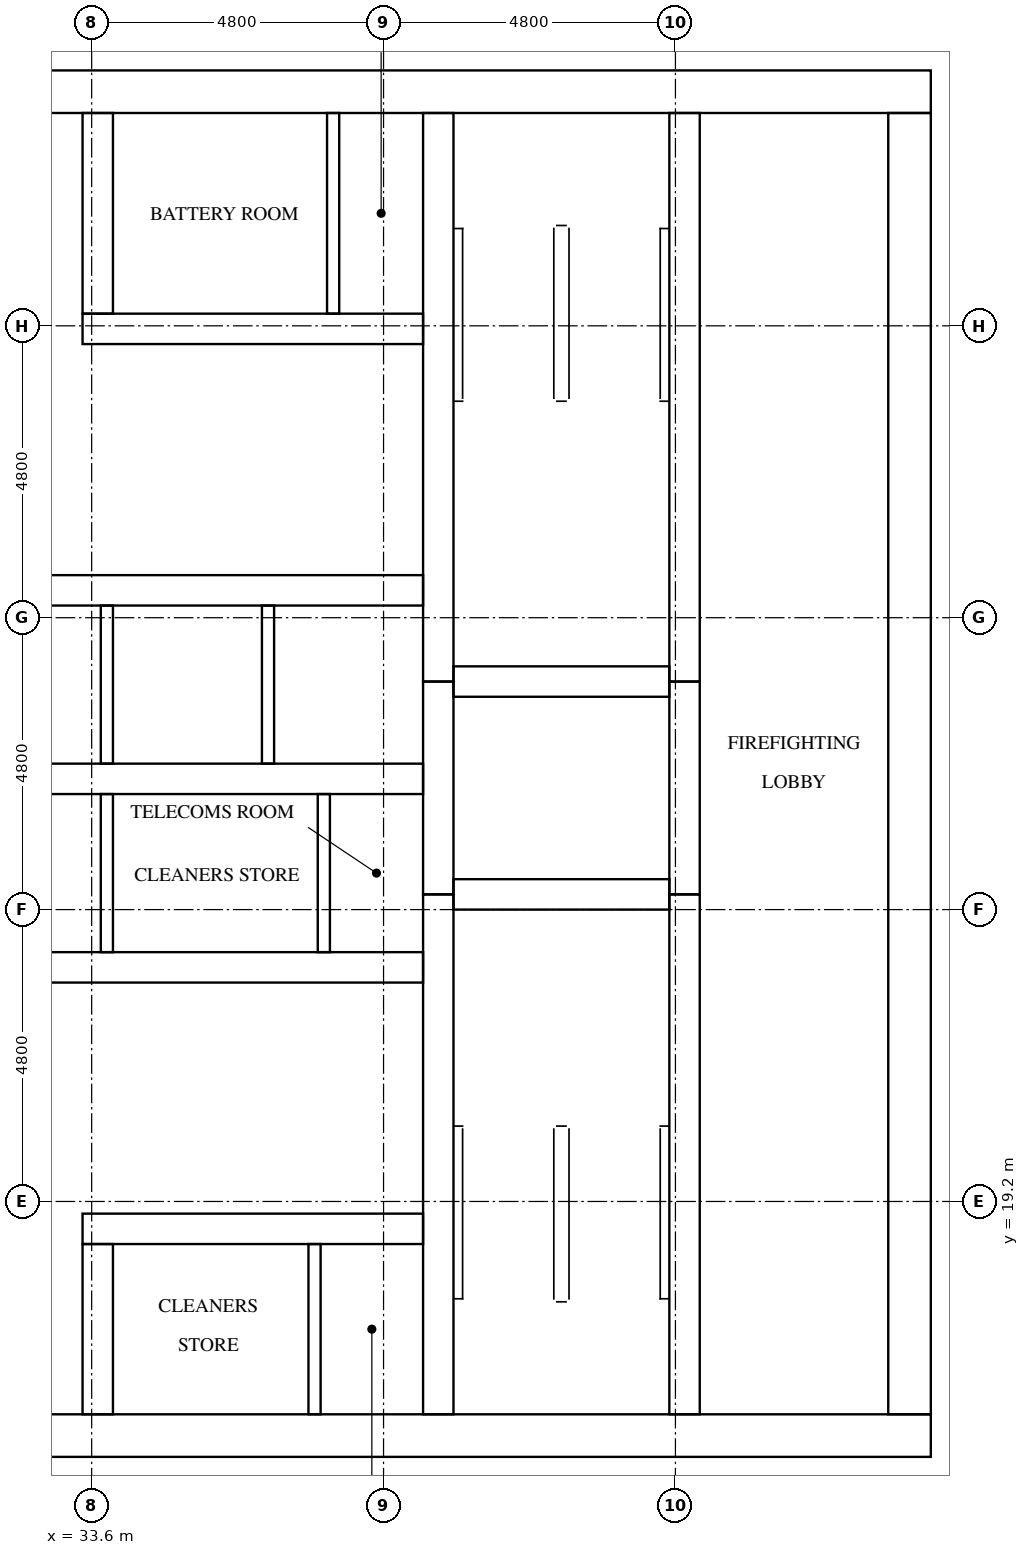
"""IFC4 building model, lengths in metres.
Left out: names, types, materials, properties, quantities, classifications, styles, units other than length and angle.
Written with IfcOpenShell. Run it as: python <this file> out.ifc"""

import sys

from ifc_helpers import new_model, si_unit, direction, frame, frame_2d, origin, place, context, subcontext, project, spatial, rectangle, extrude, element, fill, save


model = new_model("IFC4")
c1 = context("Model", 3, precision=1e-05, world=origin(), true_north=direction((0.0, 1.0)))
c2 = subcontext(c1, "Body", "Model", "MODEL_VIEW")
j1 = project(units=[si_unit("LENGTHUNIT", "METRE"), si_unit("PLANEANGLEUNIT", "RADIAN")], contexts=[c1])
p1 = place(None, origin())
s1 = spatial("IfcSite", under=j1, at=p1, CompositionType="ELEMENT")
p2 = place(p1, origin())
s2 = spatial("IfcBuilding", under=s1, at=p2, CompositionType="ELEMENT")
p3 = place(p2, frame((0.0, 0.0, 182.4)))
s3 = spatial("IfcBuildingStorey", under=s2, at=p3, CompositionType="ELEMENT", Elevation=182.4)
p4 = place(p3, frame((15.0, 15.35, 0.0), z_axis=(0.0, 0.0, 1.0), x_axis=(1.0, 0.0, 0.0)))
e1 = element("IfcWall", 1, at=p4, inside=s3, PredefinedType="SHEAR", context=c2, shape_type="SweptSolid", body=[
    extrude(rectangle(XDim=32.4, YDim=0.7, at=frame_2d((16.2, 0.0))), origin(), (0.0, 0.0, 1.0), 3.2),
])
p5 = place(p4, frame((15.3, 0.0, 0.0)))
e2 = element("IfcOpeningElement", 2, at=p5, cuts=e1, PredefinedType="OPENING", context=c2, shape_type="SweptSolid", body=[
    extrude(rectangle(XDim=1.8, YDim=2.1, at=frame_2d((0.9, 1.05))), frame((0.0, 0.36, 0.0), z_axis=(0.0, -1.0, 0.0), x_axis=(1.0, 0.0, 0.0)), (0.0, 0.0, 1.0), 0.72),
])
p6 = place(p3, frame((15.0, 37.45, 0.0), z_axis=(0.0, 0.0, 1.0), x_axis=(1.0, 0.0, 0.0)))
e3 = element("IfcWall", 3, at=p6, inside=s3, PredefinedType="SHEAR", context=c2, shape_type="SweptSolid", body=[
    extrude(rectangle(XDim=32.4, YDim=0.7, at=frame_2d((16.2, 0.0))), origin(), (0.0, 0.0, 1.0), 3.2),
])
p7 = place(p6, frame((15.3, 0.0, 0.0)))
e4 = element("IfcOpeningElement", 4, at=p7, cuts=e3, PredefinedType="OPENING", context=c2, shape_type="SweptSolid", body=[
    extrude(rectangle(XDim=1.8, YDim=2.1, at=frame_2d((0.9, 1.05))), frame((0.0, 0.36, 0.0), z_axis=(0.0, -1.0, 0.0), x_axis=(1.0, 0.0, 0.0)), (0.0, 0.0, 1.0), 0.72),
])
p8 = place(p6, frame((1.544, 0.0, 0.0)))
e5 = element("IfcOpeningElement", 5, at=p8, cuts=e3, PredefinedType="OPENING", context=c2, shape_type="SweptSolid", body=[
    extrude(rectangle(XDim=1.0, YDim=2.1, at=frame_2d((0.5, 1.05))), frame((0.0, 0.36, 0.0), z_axis=(0.0, -1.0, 0.0), x_axis=(1.0, 0.0, 0.0)), (0.0, 0.0, 1.0), 0.72),
])
p9 = place(p6, frame((5.219, 0.0, 0.0)))
e6 = element("IfcOpeningElement", 6, at=p9, cuts=e3, PredefinedType="OPENING", context=c2, shape_type="SweptSolid", body=[
    extrude(rectangle(XDim=1.0, YDim=2.1, at=frame_2d((0.5, 1.05))), frame((0.0, 0.36, 0.0), z_axis=(0.0, -1.0, 0.0), x_axis=(1.0, 0.0, 0.0)), (0.0, 0.0, 1.0), 0.72),
])
p10 = place(p3, frame((47.05, 15.7, 0.0), z_axis=(0.0, 0.0, 1.0), x_axis=(0.0, 1.0, 0.0)))
e7 = element("IfcWall", 7, at=p10, inside=s3, PredefinedType="SHEAR", context=c2, shape_type="SweptSolid", body=[
    extrude(rectangle(XDim=21.4, YDim=0.7, at=frame_2d((10.7, 0.0))), origin(), (0.0, 0.0, 1.0), 3.2),
])
p11 = place(p10, frame((10.4, 0.0, 0.0)))
e8 = element("IfcOpeningElement", 8, at=p11, cuts=e7, PredefinedType="OPENING", context=c2, shape_type="SweptSolid", body=[
    extrude(rectangle(XDim=1.2, YDim=2.1, at=frame_2d((0.6, 1.05))), frame((0.0, 0.36, 0.0), z_axis=(0.0, -1.0, 0.0), x_axis=(1.0, 0.0, 0.0)), (0.0, 0.0, 1.0), 0.72),
])
p12 = place(p3, frame((39.3, 15.7, 0.0), z_axis=(0.0, 0.0, 1.0), x_axis=(0.0, 1.0, 0.0)))
e9 = element("IfcWall", 9, at=p12, inside=s3, PredefinedType="SHEAR", context=c2, shape_type="SweptSolid", body=[
    extrude(rectangle(XDim=8.55, YDim=0.5, at=frame_2d((4.275, 0.0))), origin(), (0.0, 0.0, 1.0), 3.2),
])
p13 = place(p3, frame((39.3, 24.25, 0.0), z_axis=(0.0, 0.0, 1.0), x_axis=(0.0, 1.0, 0.0)))
e10 = element("IfcWall", 10, at=p13, inside=s3, PredefinedType="SHEAR", context=c2, shape_type="SweptSolid", body=[
    extrude(rectangle(XDim=3.5, YDim=0.5, at=frame_2d((1.75, 0.0))), origin(), (0.0, 0.0, 1.0), 3.2),
])
p14 = place(p3, frame((39.3, 27.75, 0.0), z_axis=(0.0, 0.0, 1.0), x_axis=(0.0, 1.0, 0.0)))
e11 = element("IfcWall", 11, at=p14, inside=s3, PredefinedType="SHEAR", context=c2, shape_type="SweptSolid", body=[
    extrude(rectangle(XDim=9.35, YDim=0.5, at=frame_2d((4.675, 0.0))), origin(), (0.0, 0.0, 1.0), 3.2),
])
p15 = place(p3, frame((43.35, 15.7, 0.0), z_axis=(0.0, 0.0, 1.0), x_axis=(0.0, 1.0, 0.0)))
e12 = element("IfcWall", 12, at=p15, inside=s3, PredefinedType="SHEAR", context=c2, shape_type="SweptSolid", body=[
    extrude(rectangle(XDim=8.55, YDim=0.5, at=frame_2d((4.275, 0.0))), origin(), (0.0, 0.0, 1.0), 3.2),
])
p16 = place(p15, frame((0.5, 0.0, 0.0)))
e13 = element("IfcOpeningElement", 13, at=p16, cuts=e12, PredefinedType="OPENING", context=c2, shape_type="SweptSolid", body=[
    extrude(rectangle(XDim=1.2, YDim=2.1, at=frame_2d((0.6, 1.05))), frame((0.0, 0.26, 0.0), z_axis=(0.0, -1.0, 0.0), x_axis=(1.0, 0.0, 0.0)), (0.0, 0.0, 1.0), 0.52),
])
p17 = place(p3, frame((43.35, 24.25, 0.0), z_axis=(0.0, 0.0, 1.0), x_axis=(0.0, 1.0, 0.0)))
e14 = element("IfcWall", 14, at=p17, inside=s3, PredefinedType="SHEAR", context=c2, shape_type="SweptSolid", body=[
    extrude(rectangle(XDim=3.5, YDim=0.5, at=frame_2d((1.75, 0.0))), origin(), (0.0, 0.0, 1.0), 3.2),
])
p18 = place(p17, frame((1.2, 0.0, 0.0)))
e15 = element("IfcOpeningElement", 15, at=p18, cuts=e14, PredefinedType="OPENING", context=c2, shape_type="SweptSolid", body=[
    extrude(rectangle(XDim=1.1, YDim=2.1, at=frame_2d((0.55, 1.05))), frame((0.0, 0.26, 0.0), z_axis=(0.0, -1.0, 0.0), x_axis=(1.0, 0.0, 0.0)), (0.0, 0.0, 1.0), 0.52),
])
p19 = place(p3, frame((43.35, 27.75, 0.0), z_axis=(0.0, 0.0, 1.0), x_axis=(0.0, 1.0, 0.0)))
e16 = element("IfcWall", 16, at=p19, inside=s3, PredefinedType="SHEAR", context=c2, shape_type="SweptSolid", body=[
    extrude(rectangle(XDim=9.35, YDim=0.5, at=frame_2d((4.675, 0.0))), origin(), (0.0, 0.0, 1.0), 3.2),
])
p20 = place(p19, frame((7.65, 0.0, 0.0)))
e17 = element("IfcOpeningElement", 17, at=p20, cuts=e16, PredefinedType="OPENING", context=c2, shape_type="SweptSolid", body=[
    extrude(rectangle(XDim=1.2, YDim=2.1, at=frame_2d((0.6, 1.05))), frame((0.0, 0.26, 0.0), z_axis=(0.0, -1.0, 0.0), x_axis=(1.0, 0.0, 0.0)), (0.0, 0.0, 1.0), 0.52),
])
for number, where, z_axis, x_axis in (
    (18, (39.55, 24.25, 0.0), (0.0, 0.0, 1.0), (1.0, 0.0, 0.0)),
    (19, (39.55, 27.75, 0.0), (0.0, 0.0, 1.0), (1.0, 0.0, 0.0)),
):
    element("IfcWall", number, at=place(p3, frame(where, z_axis=z_axis, x_axis=x_axis)), inside=s3, PredefinedType="SHEAR", context=c2, shape_type="SweptSolid", body=[
        extrude(rectangle(XDim=3.55, YDim=0.5, at=frame_2d((1.775, 0.0))), origin(), (0.0, 0.0, 1.0), 3.2),
    ])
p21 = place(p3, frame((33.45, 18.75, 0.0), z_axis=(0.0, 0.0, 1.0), x_axis=(1.0, 0.0, 0.0)))
e20 = element("IfcWall", 20, at=p21, inside=s3, PredefinedType="SHEAR", context=c2, shape_type="SweptSolid", body=[
    extrude(rectangle(XDim=5.6, YDim=0.5, at=frame_2d((2.8, 0.0))), origin(), (0.0, 0.0, 1.0), 3.2),
])
p22 = place(p21, frame((1.607, 0.0, 0.0)))
e21 = element("IfcOpeningElement", 21, at=p22, cuts=e20, PredefinedType="OPENING", context=c2, shape_type="SweptSolid", body=[
    extrude(rectangle(XDim=1.0, YDim=2.1, at=frame_2d((0.5, 1.05))), frame((0.0, 0.26, 0.0), z_axis=(0.0, -1.0, 0.0), x_axis=(1.0, 0.0, 0.0)), (0.0, 0.0, 1.0), 0.52),
])
p23 = place(p21, frame((4.258, 0.0, 0.0)))
e22 = element("IfcOpeningElement", 22, at=p23, cuts=e20, PredefinedType="OPENING", context=c2, shape_type="SweptSolid", body=[
    extrude(rectangle(XDim=1.0, YDim=2.1, at=frame_2d((0.5, 1.05))), frame((0.0, 0.26, 0.0), z_axis=(0.0, -1.0, 0.0), x_axis=(1.0, 0.0, 0.0)), (0.0, 0.0, 1.0), 0.52),
])
p24 = place(p3, frame((23.35, 23.05, 0.0), z_axis=(0.0, 0.0, 1.0), x_axis=(1.0, 0.0, 0.0)))
e23 = element("IfcWall", 23, at=p24, inside=s3, PredefinedType="SHEAR", context=c2, shape_type="SweptSolid", body=[
    extrude(rectangle(XDim=15.7, YDim=0.5, at=frame_2d((7.85, 0.0))), origin(), (0.0, 0.0, 1.0), 3.2),
])
p25 = place(p24, frame((2.05, 0.0, 0.0)))
e24 = element("IfcOpeningElement", 24, at=p25, cuts=e23, PredefinedType="OPENING", context=c2, shape_type="SweptSolid", body=[
    extrude(rectangle(XDim=1.0, YDim=2.1, at=frame_2d((0.5, 1.05))), frame((0.0, 0.26, 0.0), z_axis=(0.0, -1.0, 0.0), x_axis=(1.0, 0.0, 0.0)), (0.0, 0.0, 1.0), 0.52),
])
p26 = place(p24, frame((11.784, 0.0, 0.0)))
e25 = element("IfcOpeningElement", 25, at=p26, cuts=e23, PredefinedType="OPENING", context=c2, shape_type="SweptSolid", body=[
    extrude(rectangle(XDim=1.0, YDim=2.1, at=frame_2d((0.5, 1.05))), frame((0.0, 0.26, 0.0), z_axis=(0.0, -1.0, 0.0), x_axis=(1.0, 0.0, 0.0)), (0.0, 0.0, 1.0), 0.52),
])
p27 = place(p24, frame((14.434, 0.0, 0.0)))
e26 = element("IfcOpeningElement", 26, at=p27, cuts=e23, PredefinedType="OPENING", context=c2, shape_type="SweptSolid", body=[
    extrude(rectangle(XDim=1.0, YDim=2.1, at=frame_2d((0.5, 1.05))), frame((0.0, 0.26, 0.0), z_axis=(0.0, -1.0, 0.0), x_axis=(1.0, 0.0, 0.0)), (0.0, 0.0, 1.0), 0.52),
])
p28 = place(p3, frame((23.35, 26.15, 0.0), z_axis=(0.0, 0.0, 1.0), x_axis=(1.0, 0.0, 0.0)))
e27 = element("IfcWall", 27, at=p28, inside=s3, PredefinedType="SHEAR", context=c2, shape_type="SweptSolid", body=[
    extrude(rectangle(XDim=15.7, YDim=0.5, at=frame_2d((7.85, 0.0))), origin(), (0.0, 0.0, 1.0), 3.2),
])
p29 = place(p3, frame((23.35, 29.25, 0.0), z_axis=(0.0, 0.0, 1.0), x_axis=(1.0, 0.0, 0.0)))
e28 = element("IfcWall", 28, at=p29, inside=s3, PredefinedType="SHEAR", context=c2, shape_type="SweptSolid", body=[
    extrude(rectangle(XDim=15.7, YDim=0.5, at=frame_2d((7.85, 0.0))), origin(), (0.0, 0.0, 1.0), 3.2),
])
p30 = place(p29, frame((0.675, 0.0, 0.0)))
e29 = element("IfcOpeningElement", 29, at=p30, cuts=e28, PredefinedType="OPENING", context=c2, shape_type="SweptSolid", body=[
    extrude(rectangle(XDim=1.1, YDim=2.1, at=frame_2d((0.55, 1.05))), frame((0.0, 0.26, 0.0), z_axis=(0.0, -1.0, 0.0), x_axis=(1.0, 0.0, 0.0)), (0.0, 0.0, 1.0), 0.52),
])
p31 = place(p29, frame((3.325, 0.0, 0.0)))
e30 = element("IfcOpeningElement", 30, at=p31, cuts=e28, PredefinedType="OPENING", context=c2, shape_type="SweptSolid", body=[
    extrude(rectangle(XDim=1.1, YDim=2.1, at=frame_2d((0.55, 1.05))), frame((0.0, 0.26, 0.0), z_axis=(0.0, -1.0, 0.0), x_axis=(1.0, 0.0, 0.0)), (0.0, 0.0, 1.0), 0.52),
])
p32 = place(p29, frame((5.975, 0.0, 0.0)))
e31 = element("IfcOpeningElement", 31, at=p32, cuts=e28, PredefinedType="OPENING", context=c2, shape_type="SweptSolid", body=[
    extrude(rectangle(XDim=1.1, YDim=2.1, at=frame_2d((0.55, 1.05))), frame((0.0, 0.26, 0.0), z_axis=(0.0, -1.0, 0.0), x_axis=(1.0, 0.0, 0.0)), (0.0, 0.0, 1.0), 0.52),
])
p33 = place(p29, frame((8.625, 0.0, 0.0)))
e32 = element("IfcOpeningElement", 32, at=p33, cuts=e28, PredefinedType="OPENING", context=c2, shape_type="SweptSolid", body=[
    extrude(rectangle(XDim=1.1, YDim=2.1, at=frame_2d((0.55, 1.05))), frame((0.0, 0.26, 0.0), z_axis=(0.0, -1.0, 0.0), x_axis=(1.0, 0.0, 0.0)), (0.0, 0.0, 1.0), 0.52),
])
p34 = place(p29, frame((11.275, 0.0, 0.0)))
e33 = element("IfcOpeningElement", 33, at=p34, cuts=e28, PredefinedType="OPENING", context=c2, shape_type="SweptSolid", body=[
    extrude(rectangle(XDim=1.1, YDim=2.1, at=frame_2d((0.55, 1.05))), frame((0.0, 0.26, 0.0), z_axis=(0.0, -1.0, 0.0), x_axis=(1.0, 0.0, 0.0)), (0.0, 0.0, 1.0), 0.52),
])
p35 = place(p29, frame((13.925, 0.0, 0.0)))
e34 = element("IfcOpeningElement", 34, at=p35, cuts=e28, PredefinedType="OPENING", context=c2, shape_type="SweptSolid", body=[
    extrude(rectangle(XDim=1.1, YDim=2.1, at=frame_2d((0.55, 1.05))), frame((0.0, 0.26, 0.0), z_axis=(0.0, -1.0, 0.0), x_axis=(1.0, 0.0, 0.0)), (0.0, 0.0, 1.0), 0.52),
])
p36 = place(p3, frame((33.45, 33.55, 0.0), z_axis=(0.0, 0.0, 1.0), x_axis=(1.0, 0.0, 0.0)))
e35 = element("IfcWall", 35, at=p36, inside=s3, PredefinedType="SHEAR", context=c2, shape_type="SweptSolid", body=[
    extrude(rectangle(XDim=5.6, YDim=0.5, at=frame_2d((2.8, 0.0))), origin(), (0.0, 0.0, 1.0), 3.2),
])
p37 = place(p36, frame((1.76, 0.0, 0.0)))
e36 = element("IfcOpeningElement", 36, at=p37, cuts=e35, PredefinedType="OPENING", context=c2, shape_type="SweptSolid", body=[
    extrude(rectangle(XDim=1.0, YDim=2.1, at=frame_2d((0.5, 1.05))), frame((0.0, 0.26, 0.0), z_axis=(0.0, -1.0, 0.0), x_axis=(1.0, 0.0, 0.0)), (0.0, 0.0, 1.0), 0.52),
])
p38 = place(p36, frame((4.41, 0.0, 0.0)))
e37 = element("IfcOpeningElement", 37, at=p38, cuts=e35, PredefinedType="OPENING", context=c2, shape_type="SweptSolid", body=[
    extrude(rectangle(XDim=1.0, YDim=2.1, at=frame_2d((0.5, 1.05))), frame((0.0, 0.26, 0.0), z_axis=(0.0, -1.0, 0.0), x_axis=(1.0, 0.0, 0.0)), (0.0, 0.0, 1.0), 0.52),
])
p39 = place(p3, frame((33.7, 15.7, 0.0), z_axis=(0.0, 0.0, 1.0), x_axis=(0.0, 1.0, 0.0)))
e38 = element("IfcWall", 38, at=p39, inside=s3, PredefinedType="SHEAR", context=c2, shape_type="SweptSolid", body=[
    extrude(rectangle(XDim=2.8, YDim=0.5, at=frame_2d((1.4, 0.0))), origin(), (0.0, 0.0, 1.0), 3.2),
])
p40 = place(p3, frame((33.7, 33.8, 0.0), z_axis=(0.0, 0.0, 1.0), x_axis=(0.0, 1.0, 0.0)))
e39 = element("IfcWall", 39, at=p40, inside=s3, PredefinedType="SHEAR", context=c2, shape_type="SweptSolid", body=[
    extrude(rectangle(XDim=3.3, YDim=0.5, at=frame_2d((1.65, 0.0))), origin(), (0.0, 0.0, 1.0), 3.2),
])
p41 = place(p3, frame((33.85, 23.3, 0.0), z_axis=(0.0, 0.0, 1.0), x_axis=(0.0, 1.0, 0.0)))
e40 = element("IfcWall", 40, at=p41, inside=s3, PredefinedType="SOLIDWALL", context=c2, shape_type="SweptSolid", body=[
    extrude(rectangle(XDim=2.6, YDim=0.2, at=frame_2d((1.3, 0.0))), origin(), (0.0, 0.0, 1.0), 3.2),
])
for number, where, z_axis, x_axis in (
    (41, (33.85, 26.4, 0.0), (0.0, 0.0, 1.0), (0.0, 1.0, 0.0)),
    (42, (36.5, 26.4, 0.0), (0.0, 0.0, 1.0), (0.0, 1.0, 0.0)),
):
    element("IfcWall", number, at=place(p3, frame(where, z_axis=z_axis, x_axis=x_axis)), inside=s3, PredefinedType="SOLIDWALL", context=c2, shape_type="SweptSolid", body=[
        extrude(rectangle(XDim=2.6, YDim=0.2, at=frame_2d((1.3, 0.0))), origin(), (0.0, 0.0, 1.0), 3.2),
    ])
p42 = place(p3, frame((37.418, 23.3, 0.0), z_axis=(0.0, 0.0, 1.0), x_axis=(0.0, 1.0, 0.0)))
e43 = element("IfcWall", 43, at=p42, inside=s3, PredefinedType="PARTITIONING", context=c2, shape_type="SweptSolid", body=[
    extrude(rectangle(XDim=2.6, YDim=0.2, at=frame_2d((1.3, 0.0))), origin(), (0.0, 0.0, 1.0), 3.2),
])
p43 = place(p3, frame((37.265, 15.7, 0.0), z_axis=(0.0, 0.0, 1.0), x_axis=(0.0, 1.0, 0.0)))
e44 = element("IfcWall", 44, at=p43, inside=s3, PredefinedType="PARTITIONING", context=c2, shape_type="SweptSolid", body=[
    extrude(rectangle(XDim=2.8, YDim=0.2, at=frame_2d((1.4, 0.0))), origin(), (0.0, 0.0, 1.0), 3.2),
])
p44 = place(p3, frame((37.571, 33.8, 0.0), z_axis=(0.0, 0.0, 1.0), x_axis=(0.0, 1.0, 0.0)))
e45 = element("IfcWall", 45, at=p44, inside=s3, PredefinedType="PARTITIONING", context=c2, shape_type="SweptSolid", body=[
    extrude(rectangle(XDim=3.3, YDim=0.2, at=frame_2d((1.65, 0.0))), origin(), (0.0, 0.0, 1.0), 3.2),
])
p45 = place(p33, origin())
e46 = element("IfcDoor", 46, at=p45, inside=s3, OperationType="DOUBLE_DOOR_SLIDING", PredefinedType="DOOR", context=c2, shape_type="SweptSolid", body=[
    extrude(rectangle(XDim=1.1, YDim=2.1, at=frame_2d((0.55, 1.05))), frame((0.0, 0.025, 0.0), z_axis=(0.0, -1.0, 0.0), x_axis=(1.0, 0.0, 0.0)), (0.0, 0.0, 1.0), 0.05),
])
fill(e32, e46)
p46 = place(p34, origin())
e47 = element("IfcDoor", 47, at=p46, inside=s3, OperationType="DOUBLE_DOOR_SLIDING", PredefinedType="DOOR", context=c2, shape_type="SweptSolid", body=[
    extrude(rectangle(XDim=1.1, YDim=2.1, at=frame_2d((0.55, 1.05))), frame((0.0, 0.025, 0.0), z_axis=(0.0, -1.0, 0.0), x_axis=(1.0, 0.0, 0.0)), (0.0, 0.0, 1.0), 0.05),
])
fill(e33, e47)
p47 = place(p35, origin())
e48 = element("IfcDoor", 48, at=p47, inside=s3, OperationType="DOUBLE_DOOR_SLIDING", PredefinedType="DOOR", context=c2, shape_type="SweptSolid", body=[
    extrude(rectangle(XDim=1.1, YDim=2.1, at=frame_2d((0.55, 1.05))), frame((0.0, 0.025, 0.0), z_axis=(0.0, -1.0, 0.0), x_axis=(1.0, 0.0, 0.0)), (0.0, 0.0, 1.0), 0.05),
])
fill(e34, e48)
p48 = place(p18, origin())
e49 = element("IfcDoor", 49, at=p48, inside=s3, OperationType="DOUBLE_DOOR_SLIDING", PredefinedType="DOOR", context=c2, shape_type="SweptSolid", body=[
    extrude(rectangle(XDim=1.1, YDim=2.1, at=frame_2d((0.55, 1.05))), frame((0.0, 0.025, 0.0), z_axis=(0.0, -1.0, 0.0), x_axis=(1.0, 0.0, 0.0)), (0.0, 0.0, 1.0), 0.05),
])
fill(e15, e49)
p49 = place(p16, origin())
e50 = element("IfcDoor", 50, at=p49, inside=s3, OperationType="SINGLE_SWING_RIGHT", PredefinedType="DOOR", context=c2, shape_type="SweptSolid", body=[
    extrude(rectangle(XDim=1.2, YDim=2.1, at=frame_2d((0.6, 1.05))), frame((0.0, 0.025, 0.0), z_axis=(0.0, -1.0, 0.0), x_axis=(1.0, 0.0, 0.0)), (0.0, 0.0, 1.0), 0.05),
])
fill(e13, e50)
p50 = place(p20, origin())
e51 = element("IfcDoor", 51, at=p50, inside=s3, OperationType="SINGLE_SWING_LEFT", PredefinedType="DOOR", context=c2, shape_type="SweptSolid", body=[
    extrude(rectangle(XDim=1.2, YDim=2.1, at=frame_2d((0.6, 1.05))), frame((0.0, 0.025, 0.0), z_axis=(0.0, -1.0, 0.0), x_axis=(1.0, 0.0, 0.0)), (0.0, 0.0, 1.0), 0.05),
])
fill(e17, e51)
p51 = place(p11, origin())
e52 = element("IfcDoor", 52, at=p51, inside=s3, OperationType="SINGLE_SWING_LEFT", PredefinedType="DOOR", context=c2, shape_type="SweptSolid", body=[
    extrude(rectangle(XDim=1.2, YDim=2.1, at=frame_2d((0.6, 1.05))), frame((0.0, 0.025, 0.0), z_axis=(0.0, -1.0, 0.0), x_axis=(1.0, 0.0, 0.0)), (0.0, 0.0, 1.0), 0.05),
])
fill(e8, e52)
p52 = place(p26, frame((1.0, 0.0, 0.0), z_axis=(0.0, 0.0, 1.0), x_axis=(-1.0, 0.0, 0.0)))
e53 = element("IfcDoor", 53, at=p52, inside=s3, OperationType="SINGLE_SWING_LEFT", PredefinedType="DOOR", context=c2, shape_type="SweptSolid", body=[
    extrude(rectangle(XDim=1.0, YDim=2.1, at=frame_2d((0.5, 1.05))), frame((0.0, 0.025, 0.0), z_axis=(0.0, -1.0, 0.0), x_axis=(1.0, 0.0, 0.0)), (0.0, 0.0, 1.0), 0.05),
])
fill(e25, e53)
p53 = place(p27, frame((1.0, 0.0, 0.0), z_axis=(0.0, 0.0, 1.0), x_axis=(-1.0, 0.0, 0.0)))
e54 = element("IfcDoor", 54, at=p53, inside=s3, OperationType="SINGLE_SWING_RIGHT", PredefinedType="DOOR", context=c2, shape_type="SweptSolid", body=[
    extrude(rectangle(XDim=1.0, YDim=2.1, at=frame_2d((0.5, 1.05))), frame((0.0, 0.025, 0.0), z_axis=(0.0, -1.0, 0.0), x_axis=(1.0, 0.0, 0.0)), (0.0, 0.0, 1.0), 0.05),
])
fill(e26, e54)
p54 = place(p22, origin())
e55 = element("IfcDoor", 55, at=p54, inside=s3, OperationType="SINGLE_SWING_LEFT", PredefinedType="DOOR", context=c2, shape_type="SweptSolid", body=[
    extrude(rectangle(XDim=1.0, YDim=2.1, at=frame_2d((0.5, 1.05))), frame((0.0, 0.025, 0.0), z_axis=(0.0, -1.0, 0.0), x_axis=(1.0, 0.0, 0.0)), (0.0, 0.0, 1.0), 0.05),
])
fill(e21, e55)
p55 = place(p23, origin())
e56 = element("IfcDoor", 56, at=p55, inside=s3, OperationType="SINGLE_SWING_RIGHT", PredefinedType="DOOR", context=c2, shape_type="SweptSolid", body=[
    extrude(rectangle(XDim=1.0, YDim=2.1, at=frame_2d((0.5, 1.05))), frame((0.0, 0.025, 0.0), z_axis=(0.0, -1.0, 0.0), x_axis=(1.0, 0.0, 0.0)), (0.0, 0.0, 1.0), 0.05),
])
fill(e22, e56)
p56 = place(p37, frame((1.0, 0.0, 0.0), z_axis=(0.0, 0.0, 1.0), x_axis=(-1.0, 0.0, 0.0)))
e57 = element("IfcDoor", 57, at=p56, inside=s3, OperationType="SINGLE_SWING_LEFT", PredefinedType="DOOR", context=c2, shape_type="SweptSolid", body=[
    extrude(rectangle(XDim=1.0, YDim=2.1, at=frame_2d((0.5, 1.05))), frame((0.0, 0.025, 0.0), z_axis=(0.0, -1.0, 0.0), x_axis=(1.0, 0.0, 0.0)), (0.0, 0.0, 1.0), 0.05),
])
fill(e36, e57)
p57 = place(p38, frame((1.0, 0.0, 0.0), z_axis=(0.0, 0.0, 1.0), x_axis=(-1.0, 0.0, 0.0)))
e58 = element("IfcDoor", 58, at=p57, inside=s3, OperationType="SINGLE_SWING_RIGHT", PredefinedType="DOOR", context=c2, shape_type="SweptSolid", body=[
    extrude(rectangle(XDim=1.0, YDim=2.1, at=frame_2d((0.5, 1.05))), frame((0.0, 0.025, 0.0), z_axis=(0.0, -1.0, 0.0), x_axis=(1.0, 0.0, 0.0)), (0.0, 0.0, 1.0), 0.05),
])
fill(e37, e58)
save(model, sys.argv[1])
